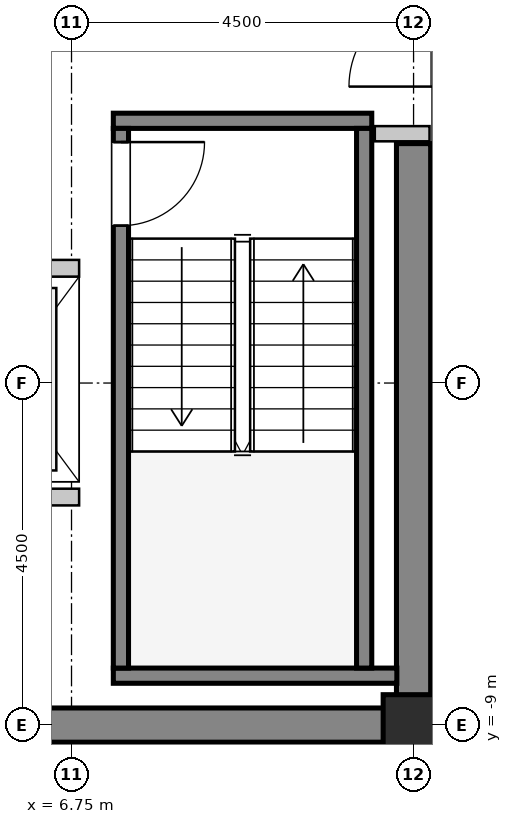
"""IFC4 building model, lengths in metres.
Left out: names, types, materials, properties, quantities, classifications, styles, units other than length and angle.
Written with IfcOpenShell. Run it as: python <this file> out.ifc"""

import sys

from ifc_helpers import new_model, si_unit, direction, frame, frame_2d, origin, origin_2d, place, context, subcontext, project, spatial, rectangle, hollow_rectangle, extrude, source, transform, mapped, element, fill, save


model = new_model("IFC4")
c1 = context("Model", 3, precision=1e-05, world=origin(), true_north=direction((0.0, 1.0)))
c2 = subcontext(c1, "Body", "Model", "MODEL_VIEW")
j1 = project(units=[si_unit("LENGTHUNIT", "METRE"), si_unit("PLANEANGLEUNIT", "RADIAN")], contexts=[c1])
p1 = place(None, origin())
s1 = spatial("IfcSite", under=j1, at=p1, CompositionType="ELEMENT")
p2 = place(p1, origin())
s2 = spatial("IfcBuilding", under=s1, at=p2, CompositionType="ELEMENT")
p3 = place(p2, frame((0.0, 0.0, 210.4)))
s3 = spatial("IfcBuildingStorey", under=s2, at=p3, CompositionType="ELEMENT", Elevation=210.4)
m1 = source(origin(), c2, "Body", "SweptSolid", [
    extrude(rectangle(XDim=9.925, YDim=0.45, at=frame_2d((4.962, 0.0))), origin(), (0.0, 0.0, 1.0), 3.8),
])
p4 = place(p3, frame((1.55, -9.0, 0.0), z_axis=(0.0, 0.0, 1.0), x_axis=(1.0, 0.0, 0.0)))
e1 = element("IfcWall", 1, at=p4, inside=s3, PredefinedType="SHEAR", context=c2, shape_type="MappedRepresentation", body=[
    mapped(m1, transform((0.0, 0.0, 0.0), x_axis=(1.0, 0.0, 0.0), y_axis=(0.0, 1.0, 0.0), z_axis=(0.0, 0.0, 1.0), scale=1.0)),
])
m2 = source(origin(), c2, "Body", "SweptSolid", [
    extrude(rectangle(XDim=7.425, YDim=0.45, at=frame_2d((3.712, 0.0))), origin(), (0.0, 0.0, 1.0), 3.8),
])
p5 = place(p3, frame((11.25, -8.775, 0.0), z_axis=(0.0, 0.0, 1.0), x_axis=(0.0, 1.0, 0.0)))
e2 = element("IfcWall", 2, at=p5, inside=s3, PredefinedType="SHEAR", context=c2, shape_type="MappedRepresentation", body=[
    mapped(m2, transform((0.0, 0.0, 0.0), x_axis=(1.0, 0.0, 0.0), y_axis=(0.0, 1.0, 0.0), z_axis=(0.0, 0.0, 1.0), scale=1.0)),
])
m3 = source(origin(), c2, "Body", "SweptSolid", [
    extrude(hollow_rectangle(XDim=0.8, YDim=0.8, WallThickness=0.04, InnerFilletRadius=0.04, OuterFilletRadius=0.08, at=origin_2d()), origin(), (0.0, 0.0, 1.0), 3.8),
])
p6 = place(p3, frame((11.25, -9.0, 0.0), z_axis=(0.0, 0.0, 1.0), x_axis=(1.0, 0.0, 0.0)))
e3 = element("IfcColumn", 3, at=p6, inside=s3, PredefinedType="COLUMN", context=c2, shape_type="MappedRepresentation", body=[
    mapped(m3, transform((0.0, 0.0, 0.0), x_axis=(1.0, 0.0, 0.0), y_axis=(0.0, 1.0, 0.0), z_axis=(0.0, 0.0, 1.0), scale=1.0)),
])
m4 = source(origin(), c2, "Body", "SweptSolid", [
    extrude(rectangle(XDim=3.4, YDim=0.2, at=frame_2d((1.7, 0.0))), origin(), (0.0, 0.0, 1.0), 3.8),
])
p7 = place(p3, frame((7.3, -1.05, 0.0), z_axis=(0.0, 0.0, 1.0), x_axis=(1.0, 0.0, 0.0)))
e4 = element("IfcWall", 4, at=p7, inside=s3, PredefinedType="SOLIDWALL", context=c2, shape_type="MappedRepresentation", body=[
    mapped(m4, transform((0.0, 0.0, 0.0), x_axis=(1.0, 0.0, 0.0), y_axis=(0.0, 1.0, 0.0), z_axis=(0.0, 0.0, 1.0), scale=1.0)),
])
m5 = source(origin(), c2, "Body", "SweptSolid", [
    extrude(rectangle(XDim=3.73, YDim=0.2, at=frame_2d((1.865, 0.0))), origin(), (0.0, 0.0, 1.0), 3.8),
])
p8 = place(p3, frame((7.3, -8.35, 0.0), z_axis=(0.0, 0.0, 1.0), x_axis=(1.0, 0.0, 0.0)))
e5 = element("IfcWall", 5, at=p8, inside=s3, PredefinedType="SOLIDWALL", context=c2, shape_type="MappedRepresentation", body=[
    mapped(m5, transform((0.0, 0.0, 0.0), x_axis=(1.0, 0.0, 0.0), y_axis=(0.0, 1.0, 0.0), z_axis=(0.0, 0.0, 1.0), scale=1.0)),
])
m6 = source(origin(), c2, "Body", "SweptSolid", [
    extrude(rectangle(XDim=7.1, YDim=0.2, at=frame_2d((3.55, 0.0))), origin(), (0.0, 0.0, 1.0), 3.8),
])
p9 = place(p3, frame((7.4, -1.15, 0.0), z_axis=(0.0, 0.0, 1.0), x_axis=(0.0, -1.0, 0.0)))
e6 = element("IfcWall", 6, at=p9, inside=s3, PredefinedType="SOLIDWALL", context=c2, shape_type="MappedRepresentation", body=[
    mapped(m6, transform((0.0, 0.0, 0.0), x_axis=(1.0, 0.0, 0.0), y_axis=(0.0, 1.0, 0.0), z_axis=(0.0, 0.0, 1.0), scale=1.0)),
])
p10 = place(p9, frame((0.18, 0.0, 0.0)))
e7 = element("IfcOpeningElement", 7, at=p10, cuts=e6, PredefinedType="OPENING", context=c2, shape_type="SweptSolid", body=[
    extrude(rectangle(XDim=1.1, YDim=2.15, at=frame_2d((0.55, 1.075))), frame((0.0, 0.11, 0.0), z_axis=(0.0, -1.0, 0.0), x_axis=(1.0, 0.0, 0.0)), (0.0, 0.0, 1.0), 0.22),
])
p11 = place(p3, frame((10.6, -1.15, 0.0), z_axis=(0.0, 0.0, 1.0), x_axis=(0.0, -1.0, 0.0)))
e8 = element("IfcWall", 8, at=p11, inside=s3, PredefinedType="SOLIDWALL", context=c2, shape_type="MappedRepresentation", body=[
    mapped(m6, transform((0.0, 0.0, 0.0), x_axis=(1.0, 0.0, 0.0), y_axis=(0.0, 1.0, 0.0), z_axis=(0.0, 0.0, 1.0), scale=1.0)),
])
m7 = source(origin(), c2, "Body", "SweptSolid", [
    extrude(rectangle(XDim=2.0, YDim=0.22, at=frame_2d((1.0, 0.0))), origin(), (0.0, 0.0, 1.0), 3.535),
])
p12 = place(p3, frame((6.85, -2.99, 0.0), z_axis=(0.0, 0.0, 1.0), x_axis=(-1.0, 0.0, 0.0)))
e9 = element("IfcWall", 9, at=p12, inside=s3, PredefinedType="SOLIDWALL", context=c2, shape_type="MappedRepresentation", body=[
    mapped(m7, transform((0.0, 0.0, 0.0), x_axis=(1.0, 0.0, 0.0), y_axis=(0.0, 1.0, 0.0), z_axis=(0.0, 0.0, 1.0), scale=1.0)),
])
p13 = place(p12, frame((0.4, 0.0, 0.0)))
e10 = element("IfcOpeningElement", 10, at=p13, cuts=e9, PredefinedType="OPENING", context=c2, shape_type="SweptSolid", body=[
    extrude(rectangle(XDim=1.2, YDim=2.2, at=frame_2d((0.6, 1.1))), frame((0.0, 0.12, 0.0), z_axis=(0.0, -1.0, 0.0), x_axis=(1.0, 0.0, 0.0)), (0.0, 0.0, 1.0), 0.24),
])
m8 = source(origin(), c2, "Body", "SweptSolid", [
    extrude(rectangle(XDim=2.095, YDim=0.22, at=frame_2d((1.048, 0.0))), origin(), (0.0, 0.0, 1.0), 3.535),
])
p14 = place(p3, frame((4.755, -6.0, 0.0), z_axis=(0.0, 0.0, 1.0), x_axis=(1.0, 0.0, 0.0)))
e11 = element("IfcWall", 11, at=p14, inside=s3, PredefinedType="SOLIDWALL", context=c2, shape_type="MappedRepresentation", body=[
    mapped(m8, transform((0.0, 0.0, 0.0), x_axis=(1.0, 0.0, 0.0), y_axis=(0.0, 1.0, 0.0), z_axis=(0.0, 0.0, 1.0), scale=1.0)),
])
m9 = source(origin(), c2, "Body", "SweptSolid", [
    extrude(rectangle(XDim=0.72, YDim=0.2, at=frame_2d((0.36, 0.0))), origin(), (0.0, 0.0, 1.0), 3.535),
])
p15 = place(p3, frame((10.74, -1.22, 0.0), z_axis=(0.0, 0.0, 1.0), x_axis=(1.0, 0.0, 0.0)))
e12 = element("IfcWall", 12, at=p15, inside=s3, PredefinedType="PARTITIONING", context=c2, shape_type="MappedRepresentation", body=[
    mapped(m9, transform((0.0, 0.0, 0.0), x_axis=(1.0, 0.0, 0.0), y_axis=(0.0, 1.0, 0.0), z_axis=(0.0, 0.0, 1.0), scale=1.0)),
])
m10 = source(origin(), c2, "Body", "SweptSolid", [
    extrude(rectangle(XDim=1.1, YDim=2.15, at=frame_2d((0.55, 1.075))), frame((0.0, 0.025, 0.0), z_axis=(0.0, -1.0, 0.0), x_axis=(1.0, 0.0, 0.0)), (0.0, 0.0, 1.0), 0.05),
])
p16 = place(p10, origin())
e13 = element("IfcDoor", 13, at=p16, inside=s3, OperationType="SINGLE_SWING_LEFT", PredefinedType="DOOR", context=c2, shape_type="MappedRepresentation", body=[
    mapped(m10, transform((0.0, 0.0, 0.0), x_axis=(1.0, 0.0, 0.0), y_axis=(0.0, 1.0, 0.0), z_axis=(0.0, 0.0, 1.0), scale=1.0)),
])
fill(e7, e13)
save(model, sys.argv[1])
